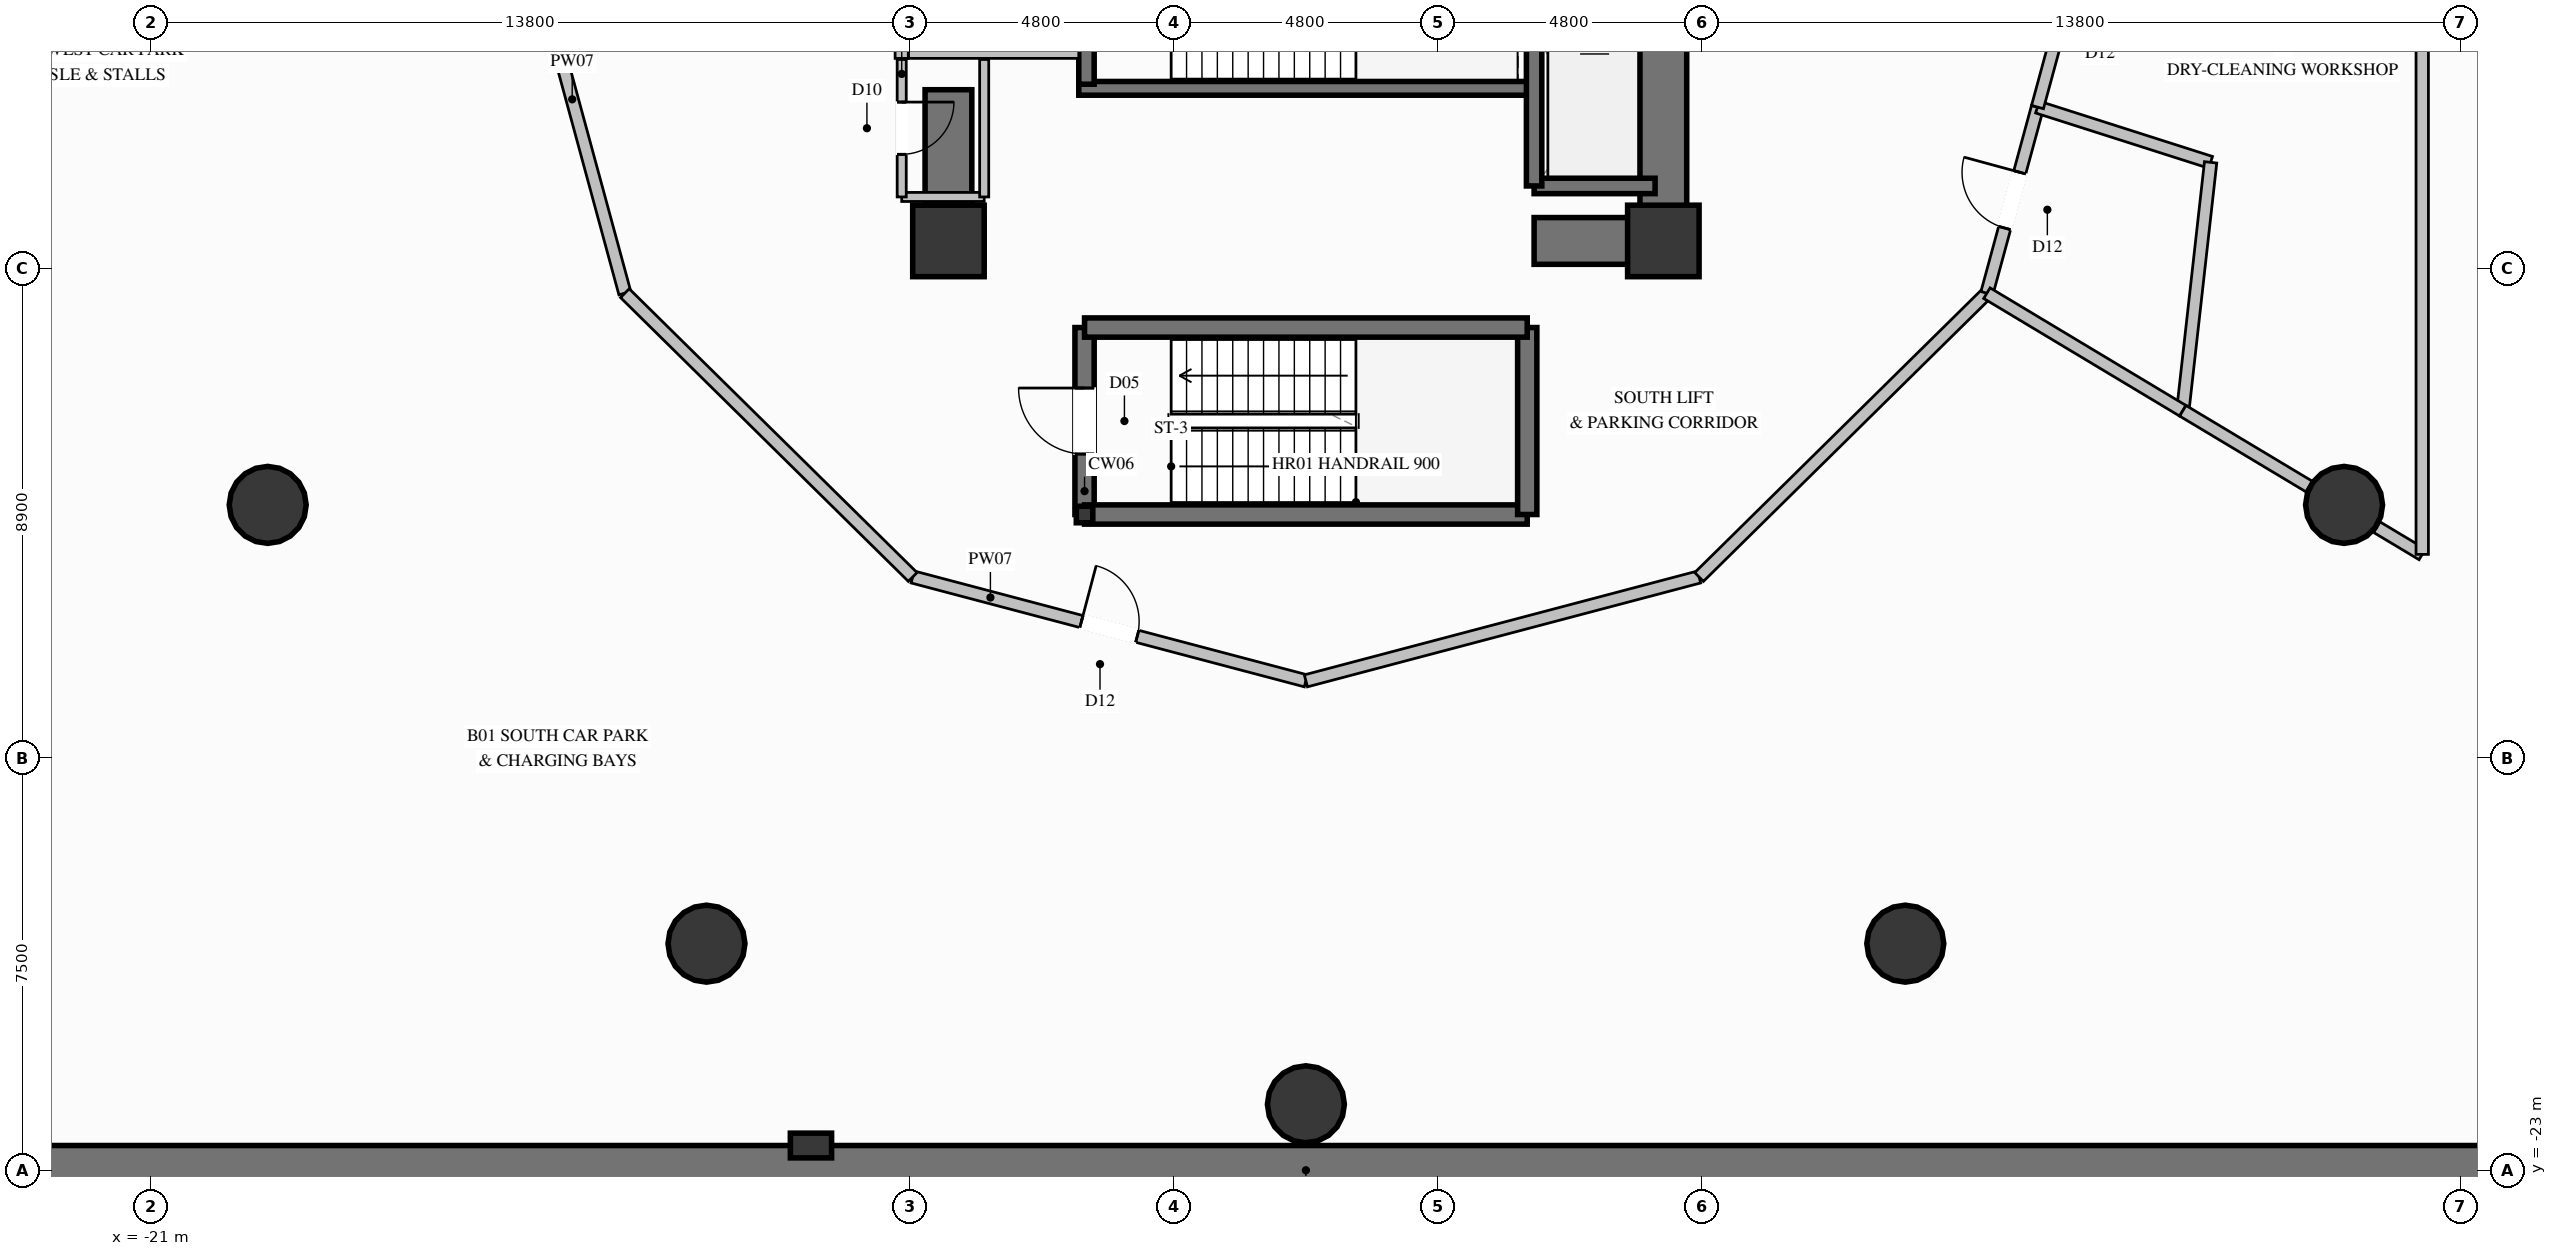
"""IFC4 building model, lengths in metres.
Left out: names, types, materials, properties, quantities, classifications, styles, units other than length and angle.
Written with IfcOpenShell. Run it as: python <this file> out.ifc"""

import sys

from ifc_helpers import new_model, si_unit, direction, frame, frame_2d, origin, origin_2d, place, context, subcontext, project, spatial, rectangle, hollow_rectangle, circle, extrude, element, fill, save


model = new_model("IFC4")
c1 = context("Model", 3, precision=1e-05, world=origin(), true_north=direction((0.0, 1.0)))
c2 = subcontext(c1, "Body", "Model", "MODEL_VIEW")
j1 = project(units=[si_unit("LENGTHUNIT", "METRE"), si_unit("PLANEANGLEUNIT", "RADIAN")], contexts=[c1])
p1 = place(None, origin())
s1 = spatial("IfcSite", under=j1, at=p1, CompositionType="ELEMENT")
p2 = place(p1, origin())
s2 = spatial("IfcBuilding", under=s1, at=p2, CompositionType="ELEMENT")
p3 = place(p2, frame((0.0, 0.0, -4.8)))
s3 = spatial("IfcBuildingStorey", under=s2, at=p3, CompositionType="ELEMENT", Elevation=-4.8)
p4 = place(p3, frame((-31.45, -23.0, 0.0), z_axis=(0.0, 0.0, 1.0), x_axis=(1.0, 0.0, 0.0)))
e1 = element("IfcWall", 1, at=p4, inside=s3, PredefinedType="SHEAR", context=c2, shape_type="SweptSolid", body=[
    extrude(rectangle(XDim=62.9, YDim=0.9, at=frame_2d((31.45, 0.0))), origin(), (0.0, 0.0, 1.0), 4.8),
])
p5 = place(p3, frame((-9.0, -22.55, 0.0), z_axis=(0.0, 0.0, 1.0), x_axis=(0.0, 1.0, 0.0)))
e2 = element("IfcColumn", 2, at=p5, inside=s3, PredefinedType="PILASTER", context=c2, shape_type="SweptSolid", body=[
    extrude(rectangle(XDim=0.45, YDim=0.75, at=origin_2d()), origin(), (0.0, 0.0, 1.0), 4.8),
])
for number, where, z_axis, x_axis in (
    (3, (-6.5, -6.1, 0.0), (0.0, 0.0, 1.0), (1.0, 0.0, 0.0)),
    (4, (6.5, -6.1, 0.0), (0.0, 0.0, 1.0), (1.0, 0.0, 0.0)),
):
    element("IfcColumn", number, at=place(p3, frame(where, z_axis=z_axis, x_axis=x_axis)), inside=s3, PredefinedType="COLUMN", context=c2, shape_type="SweptSolid", body=[
        extrude(rectangle(XDim=1.3, YDim=1.3, at=origin_2d()), origin(), (0.0, 0.0, 1.0), 4.8),
    ])
p6 = place(p3, frame((-4.13, -3.325, 0.0), z_axis=(0.0, 0.0, 1.0), x_axis=(1.0, 0.0, 0.0)))
e5 = element("IfcWall", 5, at=p6, inside=s3, PredefinedType="SOLIDWALL", context=c2, shape_type="SweptSolid", body=[
    extrude(rectangle(XDim=8.26, YDim=0.25, at=frame_2d((4.13, 0.0))), origin(), (0.0, 0.0, 1.0), 4.8),
])
p7 = place(p3, frame((-6.075, -6.1, 0.0), z_axis=(0.0, 0.0, 1.0), x_axis=(1.0, 0.0, 0.0)))
e6 = element("IfcWall", 6, at=p7, inside=s3, PredefinedType="SHEAR", context=c2, shape_type="SweptSolid", body=[
    extrude(rectangle(XDim=0.225, YDim=0.85, at=frame_2d((0.112, 0.0))), origin(), (0.0, 0.0, 1.0), 4.8),
])
p8 = place(p3, frame((4.15, -6.1, 0.0), z_axis=(0.0, 0.0, 1.0), x_axis=(1.0, 0.0, 0.0)))
e7 = element("IfcWall", 7, at=p8, inside=s3, PredefinedType="SHEAR", context=c2, shape_type="SweptSolid", body=[
    extrude(rectangle(XDim=1.925, YDim=0.85, at=frame_2d((0.962, 0.0))), origin(), (0.0, 0.0, 1.0), 4.8),
])
p9 = place(p3, frame((-6.5, -6.525, 0.0), z_axis=(0.0, 0.0, 1.0), x_axis=(0.0, 1.0, 0.0)))
e8 = element("IfcWall", 8, at=p9, inside=s3, PredefinedType="SHEAR", context=c2, shape_type="SweptSolid", body=[
    extrude(rectangle(XDim=3.175, YDim=0.85, at=frame_2d((1.587, 0.0))), origin(), (0.0, 0.0, 1.0), 4.8),
])
p10 = place(p3, frame((6.5, -6.525, 0.0), z_axis=(0.0, 0.0, 1.0), x_axis=(0.0, 1.0, 0.0)))
e9 = element("IfcWall", 9, at=p10, inside=s3, PredefinedType="SHEAR", context=c2, shape_type="SweptSolid", body=[
    extrude(rectangle(XDim=4.175, YDim=0.85, at=frame_2d((2.087, 0.0))), origin(), (0.0, 0.0, 1.0), 4.8),
])
for number, where, z_axis, x_axis in (
    (10, (-18.879, -10.9, 0.0), (0.0, 0.0, 1.0), (1.0, 0.0, 0.0)),
    (11, (-10.9, -18.879, 0.0), (0.0, 0.0, 1.0), (1.0, 0.0, 0.0)),
    (12, (0.0, -21.8, 0.0), (0.0, 0.0, 1.0), (1.0, 0.0, 0.0)),
    (13, (10.9, -18.879, 0.0), (0.0, 0.0, 1.0), (1.0, 0.0, 0.0)),
    (14, (18.879, -10.9, 0.0), (0.0, 0.0, 1.0), (1.0, 0.0, 0.0)),
):
    element("IfcColumn", number, at=place(p3, frame(where, z_axis=z_axis, x_axis=x_axis)), inside=s3, PredefinedType="COLUMN", context=c2, shape_type="SweptSolid", body=[
        extrude(circle(Radius=0.7, at=origin_2d()), origin(), (0.0, 0.0, 1.0), 4.8),
    ])
p11 = place(p3, frame((-4.025, -11.075, 0.0), z_axis=(0.0, 0.0, 1.0), x_axis=(1.0, 0.0, 0.0)))
e15 = element("IfcColumn", 15, at=p11, inside=s3, PredefinedType="COLUMN", context=c2, shape_type="SweptSolid", body=[
    extrude(hollow_rectangle(XDim=0.3, YDim=0.3, WallThickness=0.016, at=origin_2d()), origin(), (0.0, 0.0, 1.0), 4.8),
])
p12 = place(p3, frame((4.15, -5.1, 0.0), z_axis=(0.0, 0.0, 1.0), x_axis=(1.0, 0.0, 0.0)))
e16 = element("IfcWall", 16, at=p12, inside=s3, PredefinedType="SOLIDWALL", context=c2, shape_type="SweptSolid", body=[
    extrude(rectangle(XDim=2.2, YDim=0.28, at=frame_2d((1.1, 0.0))), origin(), (0.0, 0.0, 1.0), 4.395),
])
p13 = place(p3, frame((4.15, -2.4, 0.0), z_axis=(0.0, 0.0, 1.0), x_axis=(0.0, -1.0, 0.0)))
e17 = element("IfcWall", 17, at=p13, inside=s3, PredefinedType="SOLIDWALL", context=c2, shape_type="SweptSolid", body=[
    extrude(rectangle(XDim=2.7, YDim=0.28, at=frame_2d((1.35, 0.0))), origin(), (0.0, 0.0, 1.0), 4.395),
])
p14 = place(p3, frame((-3.99, -3.25, 0.0), z_axis=(0.0, 0.0, 1.0), x_axis=(0.0, 1.0, 0.0)))
e18 = element("IfcWall", 18, at=p14, inside=s3, PredefinedType="SOLIDWALL", context=c2, shape_type="SweptSolid", body=[
    extrude(rectangle(XDim=5.46, YDim=0.28, at=frame_2d((2.73, 0.0))), origin(), (0.0, 0.0, 1.0), 4.395),
])
p15 = place(p14, frame((0.937, 0.0, 0.0)))
e19 = element("IfcOpeningElement", 19, at=p15, cuts=e18, PredefinedType="OPENING", context=c2, shape_type="SweptSolid", body=[
    extrude(rectangle(XDim=1.2, YDim=2.2, at=frame_2d((0.6, 1.1))), frame((0.0, 0.15, 0.0), z_axis=(0.0, -1.0, 0.0), x_axis=(1.0, 0.0, 0.0)), (0.0, 0.0, 1.0), 0.3),
])
p16 = place(p3, frame((-7.35, -2.78, 0.0), z_axis=(0.0, 0.0, 1.0), x_axis=(0.0, 1.0, 0.0)))
e20 = element("IfcWall", 20, at=p16, inside=s3, PredefinedType="PARTITIONING", context=c2, shape_type="SweptSolid", body=[
    extrude(rectangle(XDim=5.12, YDim=0.24, at=frame_2d((2.56, 0.0))), origin(), (0.0, 0.0, 1.0), 3.28),
])
p17 = place(p16, frame((1.389, 0.0, 0.0)))
e21 = element("IfcOpeningElement", 21, at=p17, cuts=e20, PredefinedType="OPENING", context=c2, shape_type="SweptSolid", body=[
    extrude(rectangle(XDim=1.15, YDim=2.2, at=frame_2d((0.575, 1.1))), frame((0.0, 0.13, 0.0), z_axis=(0.0, -1.0, 0.0), x_axis=(1.0, 0.0, 0.0)), (0.0, 0.0, 1.0), 0.26),
])
p18 = place(p3, frame((-7.225, -2.65, 0.0), z_axis=(0.0, 0.0, 1.0), x_axis=(1.0, 0.0, 0.0)))
e22 = element("IfcWall", 22, at=p18, inside=s3, PredefinedType="PARTITIONING", context=c2, shape_type="SweptSolid", body=[
    extrude(rectangle(XDim=3.095, YDim=0.26, at=frame_2d((1.548, 0.0))), origin(), (0.0, 0.0, 1.0), 4.395),
])
p19 = place(p3, frame((-4.025, -11.075, 0.0), z_axis=(0.0, 0.0, 1.0), x_axis=(0.0, 1.0, 0.0)))
e23 = element("IfcWall", 23, at=p19, inside=s3, PredefinedType="SOLIDWALL", context=c2, shape_type="SweptSolid", body=[
    extrude(rectangle(XDim=3.4, YDim=0.35, at=frame_2d((1.7, 0.0))), origin(), (0.0, 0.0, 1.0), 4.395),
])
p20 = place(p19, frame((1.1, 0.0, 0.0)))
e24 = element("IfcOpeningElement", 24, at=p20, cuts=e23, PredefinedType="OPENING", context=c2, shape_type="SweptSolid", body=[
    extrude(rectangle(XDim=1.2, YDim=2.2, at=frame_2d((0.6, 1.1))), frame((0.0, 0.185, 0.0), z_axis=(0.0, -1.0, 0.0), x_axis=(1.0, 0.0, 0.0)), (0.0, 0.0, 1.0), 0.37),
])
p21 = place(p3, frame((-4.025, -11.075, 0.0), z_axis=(0.0, 0.0, 1.0), x_axis=(1.0, 0.0, 0.0)))
e25 = element("IfcWall", 25, at=p21, inside=s3, PredefinedType="SOLIDWALL", context=c2, shape_type="SweptSolid", body=[
    extrude(rectangle(XDim=8.05, YDim=0.35, at=frame_2d((4.025, 0.0))), origin(), (0.0, 0.0, 1.0), 4.395),
])
p22 = place(p3, frame((4.025, -11.075, 0.0), z_axis=(0.0, 0.0, 1.0), x_axis=(0.0, 1.0, 0.0)))
e26 = element("IfcWall", 26, at=p22, inside=s3, PredefinedType="SOLIDWALL", context=c2, shape_type="SweptSolid", body=[
    extrude(rectangle(XDim=3.4, YDim=0.35, at=frame_2d((1.7, 0.0))), origin(), (0.0, 0.0, 1.0), 4.395),
])
p23 = place(p3, frame((4.025, -7.675, 0.0), z_axis=(0.0, 0.0, 1.0), x_axis=(-1.0, 0.0, 0.0)))
e27 = element("IfcWall", 27, at=p23, inside=s3, PredefinedType="SOLIDWALL", context=c2, shape_type="SweptSolid", body=[
    extrude(rectangle(XDim=8.05, YDim=0.35, at=frame_2d((4.025, 0.0))), origin(), (0.0, 0.0, 1.0), 4.395),
])
p24 = place(p3, frame((-7.35, -5.3, 0.0), z_axis=(0.0, 0.0, 1.0), x_axis=(1.0, 0.0, 0.0)))
e28 = element("IfcWall", 28, at=p24, inside=s3, PredefinedType="PARTITIONING", context=c2, shape_type="SweptSolid", body=[
    extrude(rectangle(XDim=1.5, YDim=0.165, at=frame_2d((0.75, 0.0))), origin(), (0.0, 0.0, 1.0), 3.28),
])
p25 = place(p3, frame((-5.85, -5.3, 0.0), z_axis=(0.0, 0.0, 1.0), x_axis=(0.0, 1.0, 0.0)))
e29 = element("IfcWall", 29, at=p25, inside=s3, PredefinedType="PARTITIONING", context=c2, shape_type="SweptSolid", body=[
    extrude(rectangle(XDim=2.5, YDim=0.165, at=frame_2d((1.25, 0.0))), origin(), (0.0, 0.0, 1.0), 3.28),
])
p26 = place(p3, frame((-7.35, -2.8, 0.0), z_axis=(0.0, 0.0, 1.0), x_axis=(0.0, -1.0, 0.0)))
e30 = element("IfcWall", 30, at=p26, inside=s3, PredefinedType="PARTITIONING", context=c2, shape_type="SweptSolid", body=[
    extrude(rectangle(XDim=2.5, YDim=0.165, at=frame_2d((1.25, 0.0))), origin(), (0.0, 0.0, 1.0), 3.28),
])
p27 = place(p26, frame((0.775, 0.0, 0.0)))
e31 = element("IfcOpeningElement", 31, at=p27, cuts=e30, PredefinedType="OPENING", context=c2, shape_type="SweptSolid", body=[
    extrude(rectangle(XDim=0.95, YDim=2.1, at=frame_2d((0.475, 1.05))), frame((0.0, 0.093, 0.0), z_axis=(0.0, -1.0, 0.0), x_axis=(1.0, 0.0, 0.0)), (0.0, 0.0, 1.0), 0.185),
])
p28 = place(p3, frame((-14.3, 0.0, 0.0), z_axis=(0.0, 0.0, 1.0), x_axis=(0.262260528785, -0.964997106235, 0.0)))
e32 = element("IfcWall", 32, at=p28, inside=s3, PredefinedType="PARTITIONING", context=c2, shape_type="SweptSolid", body=[
    extrude(rectangle(XDim=7.306, YDim=0.225, at=frame_2d((3.653, 0.0))), origin(), (0.0, 0.0, 1.0), 4.395),
])
p29 = place(p3, frame((-7.15, -12.211, 0.0), z_axis=(0.0, 0.0, 1.0), x_axis=(0.966820901533, -0.255455170937, 0.0)))
e33 = element("IfcWall", 33, at=p29, inside=s3, PredefinedType="PARTITIONING", context=c2, shape_type="SweptSolid", body=[
    extrude(rectangle(XDim=7.395, YDim=0.225, at=frame_2d((3.698, 0.0))), origin(), (0.0, 0.0, 1.0), 4.395),
])
p30 = place(p29, frame((3.173, 0.0, 0.0)))
e34 = element("IfcOpeningElement", 34, at=p30, cuts=e33, PredefinedType="OPENING", context=c2, shape_type="SweptSolid", body=[
    extrude(rectangle(XDim=1.05, YDim=2.15, at=frame_2d((0.525, 1.075))), frame((0.0, 0.123, 0.0), z_axis=(0.0, -1.0, 0.0), x_axis=(1.0, 0.0, 0.0)), (0.0, 0.0, 1.0), 0.245),
])
p31 = place(p3, frame((-12.384, -7.05, 0.0), z_axis=(0.0, 0.0, 1.0), x_axis=(0.712071304345, -0.702107155303, 0.0)))
e35 = element("IfcWall", 35, at=p31, inside=s3, PredefinedType="PARTITIONING", context=c2, shape_type="SweptSolid", body=[
    extrude(rectangle(XDim=7.351, YDim=0.225, at=frame_2d((3.675, 0.0))), origin(), (0.0, 0.0, 1.0), 4.395),
])
p32 = place(p3, frame((0.0, -14.1, 0.0), z_axis=(0.0, 0.0, 1.0), x_axis=(0.966820901533, 0.255455170937, 0.0)))
e36 = element("IfcWall", 36, at=p32, inside=s3, PredefinedType="PARTITIONING", context=c2, shape_type="SweptSolid", body=[
    extrude(rectangle(XDim=7.395, YDim=0.225, at=frame_2d((3.698, 0.0))), origin(), (0.0, 0.0, 1.0), 4.395),
])
p33 = place(p3, frame((7.15, -12.211, 0.0), z_axis=(0.0, 0.0, 1.0), x_axis=(0.712071304345, 0.702107155303, 0.0)))
e37 = element("IfcWall", 37, at=p33, inside=s3, PredefinedType="PARTITIONING", context=c2, shape_type="SweptSolid", body=[
    extrude(rectangle(XDim=7.351, YDim=0.225, at=frame_2d((3.675, 0.0))), origin(), (0.0, 0.0, 1.0), 4.395),
])
p34 = place(p3, frame((12.384, -7.05, 0.0), z_axis=(0.0, 0.0, 1.0), x_axis=(0.262322060278, 0.964980381506, 0.0)))
e38 = element("IfcWall", 38, at=p34, inside=s3, PredefinedType="PARTITIONING", context=c2, shape_type="SweptSolid", body=[
    extrude(rectangle(XDim=3.507, YDim=0.225, at=frame_2d((1.753, 0.0))), origin(), (0.0, 0.0, 1.0), 4.395),
])
p35 = place(p34, frame((1.228, 0.0, 0.0)))
e39 = element("IfcOpeningElement", 39, at=p35, cuts=e38, PredefinedType="OPENING", context=c2, shape_type="SweptSolid", body=[
    extrude(rectangle(XDim=1.05, YDim=2.15, at=frame_2d((0.525, 1.075))), frame((0.0, 0.123, 0.0), z_axis=(0.0, -1.0, 0.0), x_axis=(1.0, 0.0, 0.0)), (0.0, 0.0, 1.0), 0.245),
])
p36 = place(p3, frame((13.304, -3.666, 0.0), z_axis=(0.0, 0.0, 1.0), x_axis=(0.952640086108, -0.304100092634, 0.0)))
e40 = element("IfcWall", 40, at=p36, inside=s3, PredefinedType="PARTITIONING", context=c2, shape_type="SweptSolid", body=[
    extrude(rectangle(XDim=3.304, YDim=0.225, at=frame_2d((1.652, 0.0))), origin(), (0.0, 0.0, 1.0), 4.395),
])
p37 = place(p3, frame((16.452, -4.671, 0.0), z_axis=(0.0, 0.0, 1.0), x_axis=(-0.111292193905, -0.993787727624, 0.0)))
e41 = element("IfcWall", 41, at=p37, inside=s3, PredefinedType="PARTITIONING", context=c2, shape_type="SweptSolid", body=[
    extrude(rectangle(XDim=4.545, YDim=0.225, at=frame_2d((2.273, 0.0))), origin(), (0.0, 0.0, 1.0), 4.395),
])
p38 = place(p3, frame((15.946, -9.188, 0.0), z_axis=(0.0, 0.0, 1.0), x_axis=(-0.857415135643, 0.514625383333, 0.0)))
e42 = element("IfcWall", 42, at=p38, inside=s3, PredefinedType="PARTITIONING", context=c2, shape_type="SweptSolid", body=[
    extrude(rectangle(XDim=4.154, YDim=0.225, at=frame_2d((2.077, 0.0))), origin(), (0.0, 0.0, 1.0), 3.686),
])
p39 = place(p3, frame((13.304, -3.666, 0.0), z_axis=(0.0, 0.0, 1.0), x_axis=(0.262203727329, 0.965012541563, 0.0)))
e43 = element("IfcWall", 43, at=p39, inside=s3, PredefinedType="PARTITIONING", context=c2, shape_type="SweptSolid", body=[
    extrude(rectangle(XDim=3.799, YDim=0.225, at=frame_2d((1.899, 0.0))), origin(), (0.0, 0.0, 1.0), 4.395),
])
p40 = place(p39, frame((1.374, 0.0, 0.0)))
e44 = element("IfcOpeningElement", 44, at=p40, cuts=e43, PredefinedType="OPENING", context=c2, shape_type="SweptSolid", body=[
    extrude(rectangle(XDim=1.05, YDim=2.15, at=frame_2d((0.525, 1.075))), frame((0.0, 0.123, 0.0), z_axis=(0.0, -1.0, 0.0), x_axis=(1.0, 0.0, 0.0)), (0.0, 0.0, 1.0), 0.245),
])
p41 = place(p3, frame((20.3, -11.8, 0.0), z_axis=(0.0, 0.0, 1.0), x_axis=(-0.857694193222, 0.514160160761, 0.0)))
e45 = element("IfcWall", 45, at=p41, inside=s3, PredefinedType="PARTITIONING", context=c2, shape_type="SweptSolid", body=[
    extrude(rectangle(XDim=0.963, YDim=0.225, at=frame_2d((0.481, 0.0))), origin(), (0.0, 0.0, 1.0), 3.63),
])
p42 = place(p3, frame((18.242, -10.565, 0.0), z_axis=(0.0, 0.0, 1.0), x_axis=(-0.857589469087, 0.514334815573, 0.0)))
e46 = element("IfcWall", 46, at=p42, inside=s3, PredefinedType="PARTITIONING", context=c2, shape_type="SweptSolid", body=[
    extrude(rectangle(XDim=2.677, YDim=0.225, at=frame_2d((1.339, 0.0))), origin(), (0.0, 0.0, 1.0), 3.686),
])
p43 = place(p3, frame((20.3, 0.0, 0.0), z_axis=(0.0, 0.0, 1.0), x_axis=(0.0, -1.0, 0.0)))
e47 = element("IfcWall", 47, at=p43, inside=s3, PredefinedType="PARTITIONING", context=c2, shape_type="SweptSolid", body=[
    extrude(rectangle(XDim=11.8, YDim=0.225, at=frame_2d((5.9, 0.0))), origin(), (0.0, 0.0, 1.0), 4.395),
])
p44 = place(p20, origin())
e48 = element("IfcDoor", 48, at=p44, inside=s3, OperationType="SINGLE_SWING_RIGHT", PredefinedType="DOOR", context=c2, shape_type="SweptSolid", body=[
    extrude(rectangle(XDim=1.2, YDim=2.2, at=frame_2d((0.6, 1.1))), frame((0.0, 0.025, 0.0), z_axis=(0.0, -1.0, 0.0), x_axis=(1.0, 0.0, 0.0)), (0.0, 0.0, 1.0), 0.05),
])
fill(e24, e48)
p45 = place(p27, origin())
e49 = element("IfcDoor", 49, at=p45, inside=s3, OperationType="SINGLE_SWING_LEFT", PredefinedType="DOOR", context=c2, shape_type="SweptSolid", body=[
    extrude(rectangle(XDim=0.95, YDim=2.1, at=frame_2d((0.475, 1.05))), frame((0.0, 0.025, 0.0), z_axis=(0.0, -1.0, 0.0), x_axis=(1.0, 0.0, 0.0)), (0.0, 0.0, 1.0), 0.05),
])
fill(e31, e49)
p46 = place(p30, origin())
e50 = element("IfcDoor", 50, at=p46, inside=s3, OperationType="SINGLE_SWING_LEFT", PredefinedType="DOOR", context=c2, shape_type="SweptSolid", body=[
    extrude(rectangle(XDim=1.05, YDim=2.15, at=frame_2d((0.525, 1.075))), frame((0.0, 0.025, 0.0), z_axis=(0.0, -1.0, 0.0), x_axis=(1.0, 0.0, 0.0)), (0.0, 0.0, 1.0), 0.05),
])
fill(e34, e50)
p47 = place(p35, origin())
e51 = element("IfcDoor", 51, at=p47, inside=s3, OperationType="SINGLE_SWING_RIGHT", PredefinedType="DOOR", context=c2, shape_type="SweptSolid", body=[
    extrude(rectangle(XDim=1.05, YDim=2.15, at=frame_2d((0.525, 1.075))), frame((0.0, 0.025, 0.0), z_axis=(0.0, -1.0, 0.0), x_axis=(1.0, 0.0, 0.0)), (0.0, 0.0, 1.0), 0.05),
])
fill(e39, e51)
save(model, sys.argv[1])
